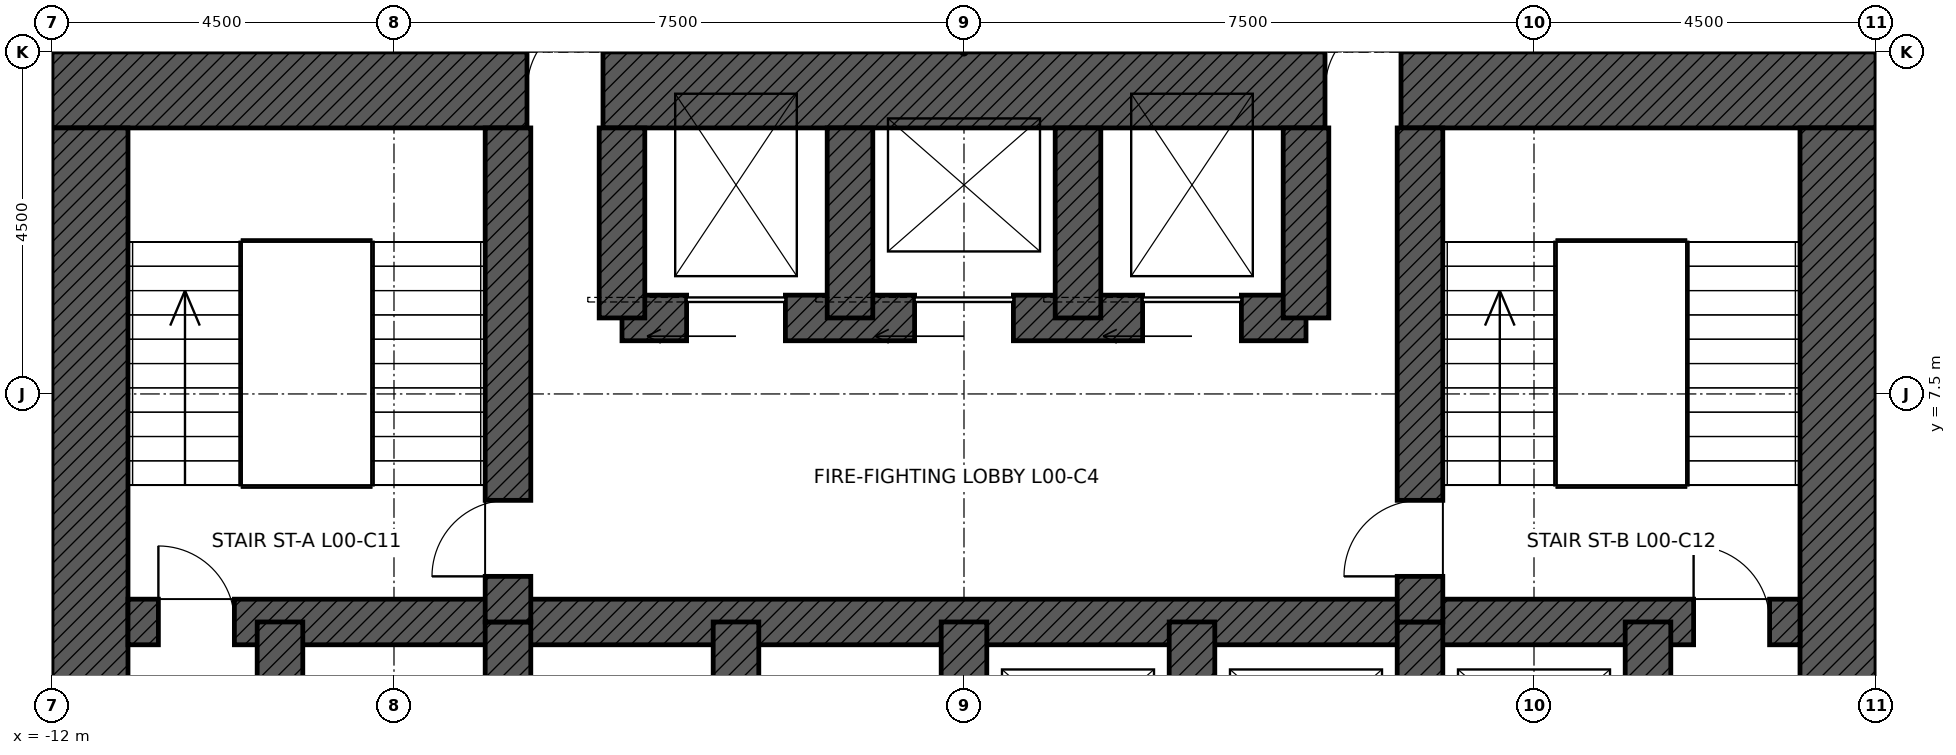
"""IFC4 building model, lengths in metres.
Left out: names, types, materials, properties, quantities, classifications, styles, units other than length and angle.
Written with IfcOpenShell. Run it as: python <this file> out.ifc"""

import sys

from ifc_helpers import new_model, si_unit, direction, frame, frame_2d, origin, place, context, subcontext, project, spatial, rectangle, extrude, element, fill, save


model = new_model("IFC4")
c1 = context("Model", 3, precision=1e-05, world=origin(), true_north=direction((0.0, 1.0)))
c2 = subcontext(c1, "Body", "Model", "MODEL_VIEW")
j1 = project(units=[si_unit("LENGTHUNIT", "METRE"), si_unit("PLANEANGLEUNIT", "RADIAN")], contexts=[c1])
p1 = place(None, origin())
s1 = spatial("IfcSite", under=j1, at=p1, CompositionType="ELEMENT")
p2 = place(p1, origin())
s2 = spatial("IfcBuilding", under=s1, at=p2, CompositionType="ELEMENT")
p3 = place(p2, origin())
s3 = spatial("IfcBuildingStorey", under=s2, at=p3, CompositionType="ELEMENT", Elevation=0.0)
p4 = place(p3, frame((-12.0, 11.5, -0.3), z_axis=(0.0, 0.0, 1.0), x_axis=(1.0, 0.0, 0.0)))
e1 = element("IfcWall", 1, at=p4, inside=s3, PredefinedType="SHEAR", context=c2, shape_type="SweptSolid", body=[
    extrude(rectangle(XDim=24.0, YDim=1.0, at=frame_2d((12.0, 0.0))), origin(), (0.0, 0.0, 1.0), 7.5),
])
p5 = place(p4, frame((6.25, 0.0, 0.3)))
e2 = element("IfcOpeningElement", 2, at=p5, cuts=e1, PredefinedType="OPENING", context=c2, shape_type="SweptSolid", body=[
    extrude(rectangle(XDim=1.0, YDim=2.4, at=frame_2d((0.5, 1.2))), frame((0.0, 0.51, 0.0), z_axis=(0.0, -1.0, 0.0), x_axis=(1.0, 0.0, 0.0)), (0.0, 0.0, 1.0), 1.02),
])
p6 = place(p4, frame((16.75, 0.0, 0.3)))
e3 = element("IfcOpeningElement", 3, at=p6, cuts=e1, PredefinedType="OPENING", context=c2, shape_type="SweptSolid", body=[
    extrude(rectangle(XDim=1.0, YDim=2.4, at=frame_2d((0.5, 1.2))), frame((0.0, 0.51, 0.0), z_axis=(0.0, -1.0, 0.0), x_axis=(1.0, 0.0, 0.0)), (0.0, 0.0, 1.0), 1.02),
])
p7 = place(p3, frame((11.5, 11.0, -0.3), z_axis=(0.0, 0.0, 1.0), x_axis=(0.0, -1.0, 0.0)))
e4 = element("IfcWall", 4, at=p7, inside=s3, PredefinedType="SHEAR", context=c2, shape_type="SweptSolid", body=[
    extrude(rectangle(XDim=22.0, YDim=1.0, at=frame_2d((11.0, 0.0))), origin(), (0.0, 0.0, 1.0), 7.5),
])
p8 = place(p7, frame((10.5, 0.0, 0.3)))
e5 = element("IfcOpeningElement", 5, at=p8, cuts=e4, PredefinedType="OPENING", context=c2, shape_type="SweptSolid", body=[
    extrude(rectangle(XDim=1.0, YDim=2.4, at=frame_2d((0.5, 1.2))), frame((0.0, 0.51, 0.0), z_axis=(0.0, -1.0, 0.0), x_axis=(1.0, 0.0, 0.0)), (0.0, 0.0, 1.0), 1.02),
])
p9 = place(p3, frame((-11.5, -11.0, -0.3), z_axis=(0.0, 0.0, 1.0), x_axis=(0.0, 1.0, 0.0)))
e6 = element("IfcWall", 6, at=p9, inside=s3, PredefinedType="SHEAR", context=c2, shape_type="SweptSolid", body=[
    extrude(rectangle(XDim=22.0, YDim=1.0, at=frame_2d((11.0, 0.0))), origin(), (0.0, 0.0, 1.0), 7.5),
])
p10 = place(p9, frame((10.5, 0.0, 0.3)))
e7 = element("IfcOpeningElement", 7, at=p10, cuts=e6, PredefinedType="OPENING", context=c2, shape_type="SweptSolid", body=[
    extrude(rectangle(XDim=1.0, YDim=2.4, at=frame_2d((0.5, 1.2))), frame((0.0, 0.51, 0.0), z_axis=(0.0, -1.0, 0.0), x_axis=(1.0, 0.0, 0.0)), (0.0, 0.0, 1.0), 1.02),
])
p11 = place(p3, frame((-11.0, 4.5, -0.3), z_axis=(0.0, 0.0, 1.0), x_axis=(1.0, 0.0, 0.0)))
e8 = element("IfcWall", 8, at=p11, inside=s3, PredefinedType="SHEAR", context=c2, shape_type="SweptSolid", body=[
    extrude(rectangle(XDim=22.0, YDim=0.6, at=frame_2d((11.0, 0.0))), origin(), (0.0, 0.0, 1.0), 7.5),
])
p12 = place(p11, frame((0.4, 0.0, 0.3)))
e9 = element("IfcOpeningElement", 9, at=p12, cuts=e8, PredefinedType="OPENING", context=c2, shape_type="SweptSolid", body=[
    extrude(rectangle(XDim=1.0, YDim=2.1, at=frame_2d((0.5, 1.05))), frame((0.0, 0.31, 0.0), z_axis=(0.0, -1.0, 0.0), x_axis=(1.0, 0.0, 0.0)), (0.0, 0.0, 1.0), 0.62),
])
p13 = place(p11, frame((20.6, 0.0, 0.3)))
e10 = element("IfcOpeningElement", 10, at=p13, cuts=e8, PredefinedType="OPENING", context=c2, shape_type="SweptSolid", body=[
    extrude(rectangle(XDim=1.0, YDim=2.1, at=frame_2d((0.5, 1.05))), frame((0.0, 0.31, 0.0), z_axis=(0.0, -1.0, 0.0), x_axis=(1.0, 0.0, 0.0)), (0.0, 0.0, 1.0), 0.62),
])
p14 = place(p3, frame((-4.5, 8.5, -0.3), z_axis=(0.0, 0.0, 1.0), x_axis=(1.0, 0.0, 0.0)))
e11 = element("IfcWall", 11, at=p14, inside=s3, PredefinedType="SHEAR", context=c2, shape_type="SweptSolid", body=[
    extrude(rectangle(XDim=9.0, YDim=0.6, at=frame_2d((4.5, 0.0))), origin(), (0.0, 0.0, 1.0), 7.5),
])
p15 = place(p14, frame((0.85, 0.0, 0.3)))
e12 = element("IfcOpeningElement", 12, at=p15, cuts=e11, PredefinedType="OPENING", context=c2, shape_type="SweptSolid", body=[
    extrude(rectangle(XDim=1.3, YDim=2.4, at=frame_2d((0.65, 1.2))), frame((0.0, 0.31, 0.0), z_axis=(0.0, -1.0, 0.0), x_axis=(1.0, 0.0, 0.0)), (0.0, 0.0, 1.0), 0.62),
])
p16 = place(p14, frame((6.85, 0.0, 0.3)))
e13 = element("IfcOpeningElement", 13, at=p16, cuts=e11, PredefinedType="OPENING", context=c2, shape_type="SweptSolid", body=[
    extrude(rectangle(XDim=1.3, YDim=2.4, at=frame_2d((0.65, 1.2))), frame((0.0, 0.31, 0.0), z_axis=(0.0, -1.0, 0.0), x_axis=(1.0, 0.0, 0.0)), (0.0, 0.0, 1.0), 0.62),
])
p17 = place(p14, frame((3.85, 0.0, 0.3)))
e14 = element("IfcOpeningElement", 14, at=p17, cuts=e11, PredefinedType="OPENING", context=c2, shape_type="SweptSolid", body=[
    extrude(rectangle(XDim=1.3, YDim=2.4, at=frame_2d((0.65, 1.2))), frame((0.0, 0.31, 0.0), z_axis=(0.0, -1.0, 0.0), x_axis=(1.0, 0.0, 0.0)), (0.0, 0.0, 1.0), 0.62),
])
for number, where, z_axis, x_axis in (
    (15, (-9.0, 1.5, -0.3), (0.0, 0.0, 1.0), (0.0, 1.0, 0.0)),
    (16, (9.0, 1.5, -0.3), (0.0, 0.0, 1.0), (0.0, 1.0, 0.0)),
    (17, (-6.0, 1.5, -0.3), (0.0, 0.0, 1.0), (0.0, 1.0, 0.0)),
    (18, (-3.0, 1.5, -0.3), (0.0, 0.0, 1.0), (0.0, 1.0, 0.0)),
    (19, (0.0, 1.5, -0.3), (0.0, 0.0, 1.0), (0.0, 1.0, 0.0)),
    (20, (3.0, 1.5, -0.3), (0.0, 0.0, 1.0), (0.0, 1.0, 0.0)),
    (21, (6.0, 1.5, -0.3), (0.0, 0.0, 1.0), (0.0, 1.0, 0.0)),
):
    element("IfcWall", number, at=place(p3, frame(where, z_axis=z_axis, x_axis=x_axis)), inside=s3, PredefinedType="SHEAR", context=c2, shape_type="SweptSolid", body=[
        extrude(rectangle(XDim=3.0, YDim=0.6, at=frame_2d((1.5, 0.0))), origin(), (0.0, 0.0, 1.0), 7.5),
    ])
p18 = place(p3, frame((-6.0, 4.5, -0.3), z_axis=(0.0, 0.0, 1.0), x_axis=(0.0, 1.0, 0.0)))
e22 = element("IfcWall", 22, at=p18, inside=s3, PredefinedType="SHEAR", context=c2, shape_type="SweptSolid", body=[
    extrude(rectangle(XDim=6.5, YDim=0.6, at=frame_2d((3.25, 0.0))), origin(), (0.0, 0.0, 1.0), 7.5),
])
p19 = place(p18, frame((0.6, 0.0, 0.3)))
e23 = element("IfcOpeningElement", 23, at=p19, cuts=e22, PredefinedType="OPENING", context=c2, shape_type="SweptSolid", body=[
    extrude(rectangle(XDim=1.0, YDim=2.1, at=frame_2d((0.5, 1.05))), frame((0.0, 0.31, 0.0), z_axis=(0.0, -1.0, 0.0), x_axis=(1.0, 0.0, 0.0)), (0.0, 0.0, 1.0), 0.62),
])
p20 = place(p3, frame((6.0, 4.5, -0.3), z_axis=(0.0, 0.0, 1.0), x_axis=(0.0, 1.0, 0.0)))
e24 = element("IfcWall", 24, at=p20, inside=s3, PredefinedType="SHEAR", context=c2, shape_type="SweptSolid", body=[
    extrude(rectangle(XDim=6.5, YDim=0.6, at=frame_2d((3.25, 0.0))), origin(), (0.0, 0.0, 1.0), 7.5),
])
p21 = place(p20, frame((0.6, 0.0, 0.3)))
e25 = element("IfcOpeningElement", 25, at=p21, cuts=e24, PredefinedType="OPENING", context=c2, shape_type="SweptSolid", body=[
    extrude(rectangle(XDim=1.0, YDim=2.1, at=frame_2d((0.5, 1.05))), frame((0.0, 0.31, 0.0), z_axis=(0.0, -1.0, 0.0), x_axis=(1.0, 0.0, 0.0)), (0.0, 0.0, 1.0), 0.62),
])
for number, where, z_axis, x_axis in (
    (26, (-4.5, 8.5, -0.3), (0.0, 0.0, 1.0), (0.0, 1.0, 0.0)),
    (27, (4.5, 8.5, -0.3), (0.0, 0.0, 1.0), (0.0, 1.0, 0.0)),
    (28, (-1.5, 8.5, -0.3), (0.0, 0.0, 1.0), (0.0, 1.0, 0.0)),
    (29, (1.5, 8.5, -0.3), (0.0, 0.0, 1.0), (0.0, 1.0, 0.0)),
):
    element("IfcWall", number, at=place(p3, frame(where, z_axis=z_axis, x_axis=x_axis)), inside=s3, PredefinedType="SHEAR", context=c2, shape_type="SweptSolid", body=[
        extrude(rectangle(XDim=2.5, YDim=0.6, at=frame_2d((1.25, 0.0))), origin(), (0.0, 0.0, 1.0), 7.5),
    ])
p22 = place(p12, origin())
e30 = element("IfcDoor", 30, at=p22, inside=s3, OperationType="SINGLE_SWING_LEFT", PredefinedType="DOOR", context=c2, shape_type="SweptSolid", body=[
    extrude(rectangle(XDim=1.0, YDim=2.1, at=frame_2d((0.5, 1.05))), frame((0.0, 0.025, 0.0), z_axis=(0.0, -1.0, 0.0), x_axis=(1.0, 0.0, 0.0)), (0.0, 0.0, 1.0), 0.05),
])
fill(e9, e30)
p23 = place(p13, origin())
e31 = element("IfcDoor", 31, at=p23, inside=s3, OperationType="SINGLE_SWING_LEFT", PredefinedType="DOOR", context=c2, shape_type="SweptSolid", body=[
    extrude(rectangle(XDim=1.0, YDim=2.1, at=frame_2d((0.5, 1.05))), frame((0.0, 0.025, 0.0), z_axis=(0.0, -1.0, 0.0), x_axis=(1.0, 0.0, 0.0)), (0.0, 0.0, 1.0), 0.05),
])
fill(e10, e31)
p24 = place(p19, origin())
e32 = element("IfcDoor", 32, at=p24, inside=s3, OperationType="SINGLE_SWING_LEFT", PredefinedType="DOOR", context=c2, shape_type="SweptSolid", body=[
    extrude(rectangle(XDim=1.0, YDim=2.1, at=frame_2d((0.5, 1.05))), frame((0.0, 0.025, 0.0), z_axis=(0.0, -1.0, 0.0), x_axis=(1.0, 0.0, 0.0)), (0.0, 0.0, 1.0), 0.05),
])
fill(e23, e32)
p25 = place(p21, origin())
e33 = element("IfcDoor", 33, at=p25, inside=s3, OperationType="SINGLE_SWING_LEFT", PredefinedType="DOOR", context=c2, shape_type="SweptSolid", body=[
    extrude(rectangle(XDim=1.0, YDim=2.1, at=frame_2d((0.5, 1.05))), frame((0.0, 0.025, 0.0), z_axis=(0.0, -1.0, 0.0), x_axis=(1.0, 0.0, 0.0)), (0.0, 0.0, 1.0), 0.05),
])
fill(e25, e33)
p26 = place(p5, origin())
e34 = element("IfcDoor", 34, at=p26, inside=s3, OperationType="SINGLE_SWING_RIGHT", PredefinedType="DOOR", context=c2, shape_type="SweptSolid", body=[
    extrude(rectangle(XDim=1.0, YDim=2.4, at=frame_2d((0.5, 1.2))), frame((0.0, 0.025, 0.0), z_axis=(0.0, -1.0, 0.0), x_axis=(1.0, 0.0, 0.0)), (0.0, 0.0, 1.0), 0.05),
])
fill(e2, e34)
p27 = place(p6, origin())
e35 = element("IfcDoor", 35, at=p27, inside=s3, OperationType="SINGLE_SWING_RIGHT", PredefinedType="DOOR", context=c2, shape_type="SweptSolid", body=[
    extrude(rectangle(XDim=1.0, YDim=2.4, at=frame_2d((0.5, 1.2))), frame((0.0, 0.025, 0.0), z_axis=(0.0, -1.0, 0.0), x_axis=(1.0, 0.0, 0.0)), (0.0, 0.0, 1.0), 0.05),
])
fill(e3, e35)
p28 = place(p15, origin())
e36 = element("IfcDoor", 36, at=p28, inside=s3, OperationType="SLIDING_TO_LEFT", PredefinedType="DOOR", context=c2, shape_type="SweptSolid", body=[
    extrude(rectangle(XDim=1.3, YDim=2.4, at=frame_2d((0.65, 1.2))), frame((0.0, 0.025, 0.0), z_axis=(0.0, -1.0, 0.0), x_axis=(1.0, 0.0, 0.0)), (0.0, 0.0, 1.0), 0.05),
])
fill(e12, e36)
p29 = place(p16, origin())
e37 = element("IfcDoor", 37, at=p29, inside=s3, OperationType="SLIDING_TO_LEFT", PredefinedType="DOOR", context=c2, shape_type="SweptSolid", body=[
    extrude(rectangle(XDim=1.3, YDim=2.4, at=frame_2d((0.65, 1.2))), frame((0.0, 0.025, 0.0), z_axis=(0.0, -1.0, 0.0), x_axis=(1.0, 0.0, 0.0)), (0.0, 0.0, 1.0), 0.05),
])
fill(e13, e37)
p30 = place(p17, origin())
e38 = element("IfcDoor", 38, at=p30, inside=s3, OperationType="SLIDING_TO_LEFT", PredefinedType="DOOR", context=c2, shape_type="SweptSolid", body=[
    extrude(rectangle(XDim=1.3, YDim=2.4, at=frame_2d((0.65, 1.2))), frame((0.0, 0.025, 0.0), z_axis=(0.0, -1.0, 0.0), x_axis=(1.0, 0.0, 0.0)), (0.0, 0.0, 1.0), 0.05),
])
fill(e14, e38)
save(model, sys.argv[1])
